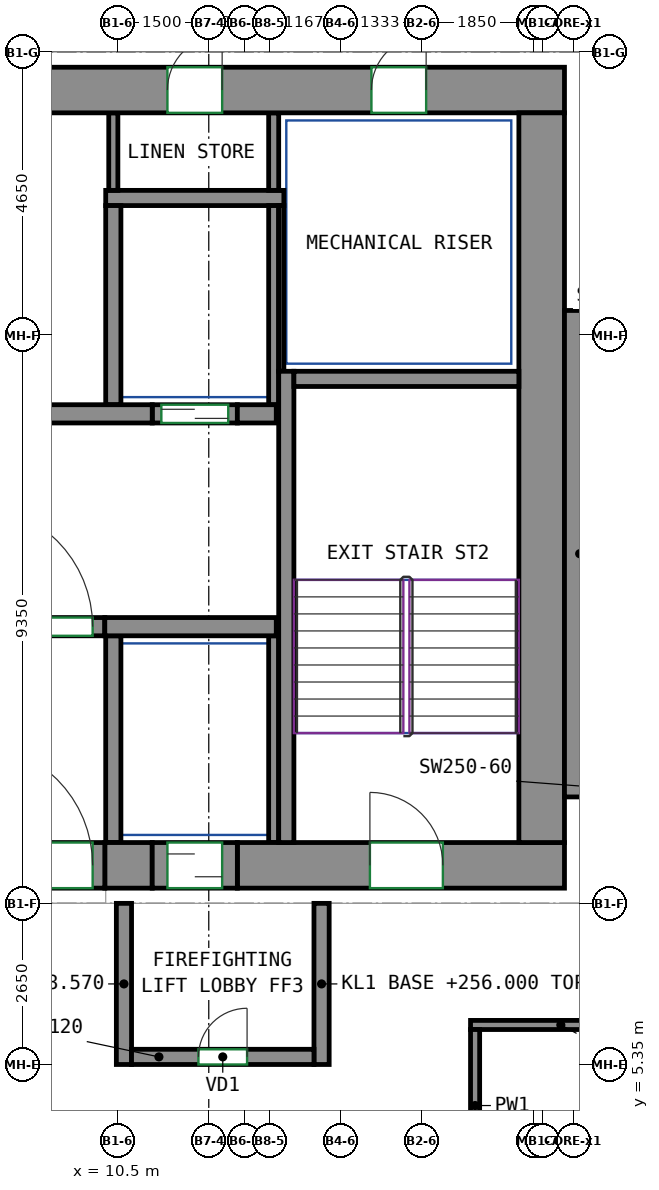
"""IFC4 building model, lengths in metres.
Left out: names, types, materials, properties, quantities, classifications, styles, units other than length and angle.
Written with IfcOpenShell. Run it as: python <this file> out.ifc"""

import sys

from ifc_helpers import new_model, si_unit, direction, frame, frame_2d, origin, place, context, subcontext, project, spatial, rectangle, extrude, source, transform, mapped, element, fill, save


model = new_model("IFC4")
c1 = context("Model", 3, precision=1e-05, world=origin(), true_north=direction((0.0, 1.0)))
c2 = subcontext(c1, "Body", "Model", "MODEL_VIEW")
j1 = project(units=[si_unit("LENGTHUNIT", "METRE"), si_unit("PLANEANGLEUNIT", "RADIAN")], contexts=[c1])
p1 = place(None, origin())
s1 = spatial("IfcSite", under=j1, at=p1, CompositionType="ELEMENT")
p2 = place(p1, origin())
s2 = spatial("IfcBuilding", under=s1, at=p2, CompositionType="ELEMENT")
p3 = place(p2, frame((0.0, 0.0, 256.0)))
s3 = spatial("IfcBuildingStorey", under=s2, at=p3, CompositionType="ELEMENT", Elevation=256.0)
m1 = source(origin(), c2, "Body", "SweptSolid", [
    extrude(rectangle(XDim=0.78, YDim=0.75, at=frame_2d((0.39, 0.0))), origin(), (0.0, 0.0, 1.0), 3.12),
])
p4 = place(p3, frame((10.29, 8.625, 0.0), z_axis=(0.0, 0.0, 1.0), x_axis=(1.0, 0.0, 0.0)))
e1 = element("IfcWall", 1, at=p4, inside=s3, PredefinedType="SHEAR", context=c2, shape_type="MappedRepresentation", body=[
    mapped(m1, transform((0.0, 0.0, 0.0))),
])
m2 = source(origin(), c2, "Body", "SweptSolid", [
    extrude(rectangle(XDim=5.38, YDim=0.75, at=frame_2d((2.69, 0.0))), origin(), (0.0, 0.0, 1.0), 3.12),
])
p5 = place(p3, frame((12.47, 8.625, 0.0), z_axis=(0.0, 0.0, 1.0), x_axis=(1.0, 0.0, 0.0)))
e2 = element("IfcWall", 2, at=p5, inside=s3, PredefinedType="SHEAR", context=c2, shape_type="MappedRepresentation", body=[
    mapped(m2, transform((0.0, 0.0, 0.0))),
])
p6 = place(p5, frame((2.18, 0.0, 0.0)))
e3 = element("IfcOpeningElement", 3, at=p6, cuts=e2, PredefinedType="OPENING", context=c2, shape_type="SweptSolid", body=[
    extrude(rectangle(XDim=1.2, YDim=2.1, at=frame_2d((0.6, 1.05))), frame((0.0, 0.385, 0.0), z_axis=(0.0, -1.0, 0.0), x_axis=(1.0, 0.0, 0.0)), (0.0, 0.0, 1.0), 0.77),
])
m3 = source(origin(), c2, "Body", "SweptSolid", [
    extrude(rectangle(XDim=33.6, YDim=0.75, at=frame_2d((16.8, 0.0))), origin(), (0.0, 0.0, 1.0), 3.12),
])
p7 = place(p3, frame((-15.75, 21.375, 0.0), z_axis=(0.0, 0.0, 1.0), x_axis=(1.0, 0.0, 0.0)))
e4 = element("IfcWall", 4, at=p7, inside=s3, PredefinedType="SHEAR", context=c2, shape_type="MappedRepresentation", body=[
    mapped(m3, transform((0.0, 0.0, 0.0))),
])
p8 = place(p7, frame((5.858, 0.0, 0.0)))
e5 = element("IfcOpeningElement", 5, at=p8, cuts=e4, PredefinedType="OPENING", context=c2, shape_type="SweptSolid", body=[
    extrude(rectangle(XDim=0.9, YDim=2.1, at=frame_2d((0.45, 1.05))), frame((0.0, 0.385, 0.0), z_axis=(0.0, -1.0, 0.0), x_axis=(1.0, 0.0, 0.0)), (0.0, 0.0, 1.0), 0.77),
])
p9 = place(p7, frame((10.923, 0.0, 0.0)))
e6 = element("IfcOpeningElement", 6, at=p9, cuts=e4, PredefinedType="OPENING", context=c2, shape_type="SweptSolid", body=[
    extrude(rectangle(XDim=0.9, YDim=2.1, at=frame_2d((0.45, 1.05))), frame((0.0, 0.385, 0.0), z_axis=(0.0, -1.0, 0.0), x_axis=(1.0, 0.0, 0.0)), (0.0, 0.0, 1.0), 0.77),
])
p10 = place(p7, frame((15.988, 0.0, 0.0)))
e7 = element("IfcOpeningElement", 7, at=p10, cuts=e4, PredefinedType="OPENING", context=c2, shape_type="SweptSolid", body=[
    extrude(rectangle(XDim=0.9, YDim=2.1, at=frame_2d((0.45, 1.05))), frame((0.0, 0.385, 0.0), z_axis=(0.0, -1.0, 0.0), x_axis=(1.0, 0.0, 0.0)), (0.0, 0.0, 1.0), 0.77),
])
p11 = place(p7, frame((21.643, 0.0, 0.0)))
e8 = element("IfcOpeningElement", 8, at=p11, cuts=e4, PredefinedType="OPENING", context=c2, shape_type="SweptSolid", body=[
    extrude(rectangle(XDim=0.9, YDim=2.1, at=frame_2d((0.45, 1.05))), frame((0.0, 0.385, 0.0), z_axis=(0.0, -1.0, 0.0), x_axis=(1.0, 0.0, 0.0)), (0.0, 0.0, 1.0), 0.77),
])
p12 = place(p7, frame((27.07, 0.0, 0.0)))
e9 = element("IfcOpeningElement", 9, at=p12, cuts=e4, PredefinedType="OPENING", context=c2, shape_type="SweptSolid", body=[
    extrude(rectangle(XDim=0.9, YDim=2.1, at=frame_2d((0.45, 1.05))), frame((0.0, 0.385, 0.0), z_axis=(0.0, -1.0, 0.0), x_axis=(1.0, 0.0, 0.0)), (0.0, 0.0, 1.0), 0.77),
])
p13 = place(p7, frame((2.275, 0.0, 0.0)))
e10 = element("IfcOpeningElement", 10, at=p13, cuts=e4, PredefinedType="OPENING", context=c2, shape_type="SweptSolid", body=[
    extrude(rectangle(XDim=0.9, YDim=2.1, at=frame_2d((0.45, 1.05))), frame((0.0, 0.385, 0.0), z_axis=(0.0, -1.0, 0.0), x_axis=(1.0, 0.0, 0.0)), (0.0, 0.0, 1.0), 0.77),
])
p14 = place(p7, frame((30.425, 0.0, 0.0)))
e11 = element("IfcOpeningElement", 11, at=p14, cuts=e4, PredefinedType="OPENING", context=c2, shape_type="SweptSolid", body=[
    extrude(rectangle(XDim=0.9, YDim=2.1, at=frame_2d((0.45, 1.05))), frame((0.0, 0.385, 0.0), z_axis=(0.0, -1.0, 0.0), x_axis=(1.0, 0.0, 0.0)), (0.0, 0.0, 1.0), 0.77),
])
m4 = source(origin(), c2, "Body", "SweptSolid", [
    extrude(rectangle(XDim=12.0, YDim=0.75, at=frame_2d((6.0, 0.0))), origin(), (0.0, 0.0, 1.0), 3.12),
])
p15 = place(p3, frame((17.475, 9.0, 0.0), z_axis=(0.0, 0.0, 1.0), x_axis=(0.0, 1.0, 0.0)))
e12 = element("IfcWall", 12, at=p15, inside=s3, PredefinedType="SHEAR", context=c2, shape_type="MappedRepresentation", body=[
    mapped(m4, transform((0.0, 0.0, 0.0))),
])
m5 = source(origin(), c2, "Body", "SweptSolid", [
    extrude(rectangle(XDim=7.75, YDim=0.25, at=frame_2d((3.875, 0.0))), origin(), (0.0, 0.0, 1.0), 3.12),
])
p16 = place(p3, frame((13.275, 9.0, 0.0), z_axis=(0.0, 0.0, 1.0), x_axis=(0.0, 1.0, 0.0)))
e13 = element("IfcWall", 13, at=p16, inside=s3, PredefinedType="SHEAR", context=c2, shape_type="MappedRepresentation", body=[
    mapped(m5, transform((0.0, 0.0, 0.0))),
])
m6 = source(origin(), c2, "Body", "SweptSolid", [
    extrude(rectangle(XDim=3.7, YDim=0.25, at=frame_2d((1.85, 0.0))), origin(), (0.0, 0.0, 1.0), 3.12),
])
p17 = place(p3, frame((13.4, 16.625, 0.0), z_axis=(0.0, 0.0, 1.0), x_axis=(1.0, 0.0, 0.0)))
e14 = element("IfcWall", 14, at=p17, inside=s3, PredefinedType="SHEAR", context=c2, shape_type="MappedRepresentation", body=[
    mapped(m6, transform((0.0, 0.0, 0.0))),
])
m7 = source(origin(), c2, "Body", "SweptSolid", [
    extrude(rectangle(XDim=8.0, YDim=0.5, at=frame_2d((4.0, 0.0))), origin(), (0.0, 0.0, 1.0), 3.12),
])
p18 = place(p3, frame((18.1, 9.75, 0.0), z_axis=(0.0, 0.0, 1.0), x_axis=(0.0, 1.0, 0.0)))
e15 = element("IfcWall", 15, at=p18, inside=s3, PredefinedType="SHEAR", context=c2, shape_type="MappedRepresentation", body=[
    mapped(m7, transform((0.0, 0.0, 0.0))),
])
m8 = source(origin(), c2, "Body", "SweptSolid", [
    extrude(rectangle(XDim=2.82, YDim=0.3, at=frame_2d((1.41, 0.0))), origin(), (0.0, 0.0, 1.0), 3.12),
])
p19 = place(p3, frame((10.29, 12.55, 0.0), z_axis=(0.0, 0.0, 1.0), x_axis=(1.0, 0.0, 0.0)))
e16 = element("IfcWall", 16, at=p19, inside=s3, PredefinedType="SHEAR", context=c2, shape_type="MappedRepresentation", body=[
    mapped(m8, transform((0.0, 0.0, 0.0))),
])
m9 = source(origin(), c2, "Body", "SweptSolid", [
    extrude(rectangle(XDim=22.08, YDim=0.3, at=frame_2d((11.04, 0.0))), origin(), (0.0, 0.0, 1.0), 3.12),
])
p20 = place(p3, frame((-11.01, 16.05, 0.0), z_axis=(0.0, 0.0, 1.0), x_axis=(1.0, 0.0, 0.0)))
e17 = element("IfcWall", 17, at=p20, inside=s3, PredefinedType="SHEAR", context=c2, shape_type="MappedRepresentation", body=[
    mapped(m9, transform((0.0, 0.0, 0.0))),
])
m10 = source(origin(), c2, "Body", "SweptSolid", [
    extrude(rectangle(XDim=0.64, YDim=0.3, at=frame_2d((0.32, 0.0))), origin(), (0.0, 0.0, 1.0), 3.12),
])
p21 = place(p3, frame((12.47, 16.05, 0.0), z_axis=(0.0, 0.0, 1.0), x_axis=(1.0, 0.0, 0.0)))
e18 = element("IfcWall", 18, at=p21, inside=s3, PredefinedType="SHEAR", context=c2, shape_type="MappedRepresentation", body=[
    mapped(m10, transform((0.0, 0.0, 0.0))),
])
m11 = source(origin(), c2, "Body", "SweptSolid", [
    extrude(rectangle(XDim=1.4, YDim=0.3, at=frame_2d((0.7, 0.0))), origin(), (0.0, 0.0, 1.0), 3.12),
])
p22 = place(p3, frame((11.07, 16.05, 0.0), z_axis=(0.0, 0.0, 1.0), x_axis=(1.0, 0.0, 0.0)))
e19 = element("IfcWall", 19, at=p22, inside=s3, PredefinedType="PARTITIONING", context=c2, shape_type="MappedRepresentation", body=[
    mapped(m11, transform((0.0, 0.0, 0.0))),
])
p23 = place(p22, frame((0.15, 0.0, 0.0)))
e20 = element("IfcOpeningElement", 20, at=p23, cuts=e19, PredefinedType="OPENING", context=c2, shape_type="SweptSolid", body=[
    extrude(rectangle(XDim=1.1, YDim=2.1, at=frame_2d((0.55, 1.05))), frame((0.0, 0.16, 0.0), z_axis=(0.0, -1.0, 0.0), x_axis=(1.0, 0.0, 0.0)), (0.0, 0.0, 1.0), 0.32),
])
m12 = source(origin(), c2, "Body", "SweptSolid", [
    extrude(rectangle(XDim=2.4, YDim=0.3, at=frame_2d((1.2, 0.0))), origin(), (0.0, 0.0, 1.0), 3.12),
])
p24 = place(p3, frame((7.89, 12.55, 0.0), z_axis=(0.0, 0.0, 1.0), x_axis=(1.0, 0.0, 0.0)))
e21 = element("IfcWall", 21, at=p24, inside=s3, PredefinedType="PARTITIONING", context=c2, shape_type="MappedRepresentation", body=[
    mapped(m12, transform((0.0, 0.0, 0.0))),
])
p25 = place(p24, frame((0.2, 0.0, 0.0)))
e22 = element("IfcOpeningElement", 22, at=p25, cuts=e21, PredefinedType="OPENING", context=c2, shape_type="SweptSolid", body=[
    extrude(rectangle(XDim=2.0, YDim=2.1, at=frame_2d((1.0, 1.05))), frame((0.0, 0.16, 0.0), z_axis=(0.0, -1.0, 0.0), x_axis=(1.0, 0.0, 0.0)), (0.0, 0.0, 1.0), 0.32),
])
m13 = source(origin(), c2, "Body", "SweptSolid", [
    extrude(rectangle(XDim=2.65, YDim=0.25, at=frame_2d((1.325, 0.0))), origin(), (0.0, 0.0, 1.0), 2.57),
])
for number, where, z_axis, x_axis in (
    (23, (10.605, 5.35, 0.0), (0.0, 0.0, 1.0), (0.0, 1.0, 0.0)),
    (24, (13.855, 5.35, 0.0), (0.0, 0.0, 1.0), (0.0, 1.0, 0.0)),
):
    element("IfcWall", number, at=place(p3, frame(where, z_axis=z_axis, x_axis=x_axis)), inside=s3, PredefinedType="PARTITIONING", context=c2, shape_type="MappedRepresentation", body=[
        mapped(m13, transform((0.0, 0.0, 0.0))),
    ])
m14 = source(origin(), c2, "Body", "SweptSolid", [
    extrude(rectangle(XDim=3.0, YDim=0.25, at=frame_2d((1.5, 0.0))), origin(), (0.0, 0.0, 1.0), 3.12),
])
p26 = place(p3, frame((10.73, 5.475, 0.0), z_axis=(0.0, 0.0, 1.0), x_axis=(1.0, 0.0, 0.0)))
e25 = element("IfcWall", 25, at=p26, inside=s3, PredefinedType="PARTITIONING", context=c2, shape_type="MappedRepresentation", body=[
    mapped(m14, transform((0.0, 0.0, 0.0))),
])
p27 = place(p26, frame((1.1, 0.0, 0.0)))
e26 = element("IfcOpeningElement", 26, at=p27, cuts=e25, PredefinedType="OPENING", context=c2, shape_type="SweptSolid", body=[
    extrude(rectangle(XDim=0.8, YDim=2.0, at=frame_2d((0.4, 1.0))), frame((0.0, 0.135, 0.0), z_axis=(0.0, -1.0, 0.0), x_axis=(1.0, 0.0, 0.0)), (0.0, 0.0, 1.0), 0.27),
])
m15 = source(origin(), c2, "Body", "SweptSolid", [
    extrude(rectangle(XDim=2.93, YDim=0.25, at=frame_2d((1.465, 0.0))), origin(), (0.0, 0.0, 1.0), 3.12),
])
p28 = place(p3, frame((10.305, 19.6, 0.0), z_axis=(0.0, 0.0, 1.0), x_axis=(1.0, 0.0, 0.0)))
e27 = element("IfcWall", 27, at=p28, inside=s3, PredefinedType="PARTITIONING", context=c2, shape_type="MappedRepresentation", body=[
    mapped(m15, transform((0.0, 0.0, 0.0))),
])
m16 = source(origin(), c2, "Body", "SweptSolid", [
    extrude(rectangle(XDim=3.275, YDim=0.165, at=frame_2d((1.638, 0.0))), origin(), (0.0, 0.0, 1.0), 3.12),
])
p29 = place(p3, frame((13.067, 16.2, 0.0), z_axis=(0.0, 0.0, 1.0), x_axis=(0.0, 1.0, 0.0)))
e28 = element("IfcWall", 28, at=p29, inside=s3, PredefinedType="PARTITIONING", context=c2, shape_type="MappedRepresentation", body=[
    mapped(m16, transform((0.0, 0.0, 0.0))),
])
m17 = source(origin(), c2, "Body", "SweptSolid", [
    extrude(rectangle(XDim=1.275, YDim=0.165, at=frame_2d((0.637, 0.0))), origin(), (0.0, 0.0, 1.0), 3.12),
])
p30 = place(p3, frame((13.067, 19.725, 0.0), z_axis=(0.0, 0.0, 1.0), x_axis=(0.0, 1.0, 0.0)))
e29 = element("IfcWall", 29, at=p30, inside=s3, PredefinedType="PARTITIONING", context=c2, shape_type="MappedRepresentation", body=[
    mapped(m17, transform((0.0, 0.0, 0.0))),
])
m18 = source(origin(), c2, "Body", "SweptSolid", [
    extrude(rectangle(XDim=3.275, YDim=0.25, at=frame_2d((1.638, 0.0))), origin(), (0.0, 0.0, 1.0), 3.12),
])
p31 = place(p3, frame((10.43, 16.2, 0.0), z_axis=(0.0, 0.0, 1.0), x_axis=(0.0, 1.0, 0.0)))
e30 = element("IfcWall", 30, at=p31, inside=s3, PredefinedType="PARTITIONING", context=c2, shape_type="MappedRepresentation", body=[
    mapped(m18, transform((0.0, 0.0, 0.0))),
])
m19 = source(origin(), c2, "Body", "SweptSolid", [
    extrude(rectangle(XDim=2.725, YDim=0.085, at=frame_2d((1.363, 0.0))), origin(), (0.0, 0.0, 1.0), 3.12),
])
p32 = place(p3, frame((13.192, 16.75, 0.0), z_axis=(0.0, 0.0, 1.0), x_axis=(0.0, 1.0, 0.0)))
e31 = element("IfcWall", 31, at=p32, inside=s3, PredefinedType="PARTITIONING", context=c2, shape_type="MappedRepresentation", body=[
    mapped(m19, transform((0.0, 0.0, 0.0))),
])
m20 = source(origin(), c2, "Body", "SweptSolid", [
    extrude(rectangle(XDim=3.4, YDim=0.25, at=frame_2d((1.7, 0.0))), origin(), (0.0, 0.0, 1.0), 3.12),
])
p33 = place(p3, frame((10.43, 9.0, 0.0), z_axis=(0.0, 0.0, 1.0), x_axis=(0.0, 1.0, 0.0)))
e32 = element("IfcWall", 32, at=p33, inside=s3, PredefinedType="PARTITIONING", context=c2, shape_type="MappedRepresentation", body=[
    mapped(m20, transform((0.0, 0.0, 0.0))),
])
m21 = source(origin(), c2, "Body", "SweptSolid", [
    extrude(rectangle(XDim=3.4, YDim=0.165, at=frame_2d((1.7, 0.0))), origin(), (0.0, 0.0, 1.0), 3.12),
])
p34 = place(p3, frame((13.067, 9.0, 0.0), z_axis=(0.0, 0.0, 1.0), x_axis=(0.0, 1.0, 0.0)))
e33 = element("IfcWall", 33, at=p34, inside=s3, PredefinedType="PARTITIONING", context=c2, shape_type="MappedRepresentation", body=[
    mapped(m21, transform((0.0, 0.0, 0.0))),
])
m22 = source(origin(), c2, "Body", "SweptSolid", [
    extrude(rectangle(XDim=1.275, YDim=0.15, at=frame_2d((0.637, 0.0))), origin(), (0.0, 0.0, 1.0), 3.12),
])
p35 = place(p3, frame((10.43, 19.725, 0.0), z_axis=(0.0, 0.0, 1.0), x_axis=(0.0, 1.0, 0.0)))
e34 = element("IfcWall", 34, at=p35, inside=s3, PredefinedType="PARTITIONING", context=c2, shape_type="MappedRepresentation", body=[
    mapped(m22, transform((0.0, 0.0, 0.0))),
])
m23 = source(origin(), c2, "Body", "SweptSolid", [
    extrude(rectangle(XDim=2.4, YDim=0.75, at=frame_2d((1.2, 0.0))), origin(), (0.0, 0.0, 1.0), 2.7),
])
p36 = place(p3, frame((7.89, 8.625, 0.0), z_axis=(0.0, 0.0, 1.0), x_axis=(1.0, 0.0, 0.0)))
e35 = element("IfcWall", 35, at=p36, inside=s3, PredefinedType="PARTITIONING", context=c2, shape_type="MappedRepresentation", body=[
    mapped(m23, transform((0.0, 0.0, 0.0))),
])
p37 = place(p36, frame((0.2, 0.0, 0.0)))
e36 = element("IfcOpeningElement", 36, at=p37, cuts=e35, PredefinedType="OPENING", context=c2, shape_type="SweptSolid", body=[
    extrude(rectangle(XDim=2.0, YDim=2.1, at=frame_2d((1.0, 1.05))), frame((0.0, 0.385, 0.0), z_axis=(0.0, -1.0, 0.0), x_axis=(1.0, 0.0, 0.0)), (0.0, 0.0, 1.0), 0.77),
])
m24 = source(origin(), c2, "Body", "SweptSolid", [
    extrude(rectangle(XDim=1.4, YDim=0.75, at=frame_2d((0.7, 0.0))), origin(), (0.0, 0.0, 1.0), 2.7),
])
p38 = place(p3, frame((11.07, 8.625, 0.0), z_axis=(0.0, 0.0, 1.0), x_axis=(1.0, 0.0, 0.0)))
e37 = element("IfcWall", 37, at=p38, inside=s3, PredefinedType="PARTITIONING", context=c2, shape_type="MappedRepresentation", body=[
    mapped(m24, transform((0.0, 0.0, 0.0))),
])
p39 = place(p38, frame((0.25, 0.0, 0.0)))
e38 = element("IfcOpeningElement", 38, at=p39, cuts=e37, PredefinedType="OPENING", context=c2, shape_type="SweptSolid", body=[
    extrude(rectangle(XDim=0.9, YDim=2.1, at=frame_2d((0.45, 1.05))), frame((0.0, 0.385, 0.0), z_axis=(0.0, -1.0, 0.0), x_axis=(1.0, 0.0, 0.0)), (0.0, 0.0, 1.0), 0.77),
])
p40 = place(p3, frame((16.305, 6.0, 0.0), z_axis=(0.0, 0.0, 1.0), x_axis=(1.0, 0.0, 0.0)))
e39 = element("IfcWall", 39, at=p40, inside=s3, PredefinedType="PARTITIONING", context=c2, shape_type="SweptSolid", body=[
    extrude(rectangle(XDim=2.97, YDim=0.15, at=frame_2d((1.485, 0.0))), origin(), (0.0, 0.0, 1.0), 3.12),
])
p41 = place(p3, frame((16.38, 3.425, 0.0), z_axis=(0.0, 0.0, 1.0), x_axis=(0.0, 1.0, 0.0)))
e40 = element("IfcWall", 40, at=p41, inside=s3, PredefinedType="PARTITIONING", context=c2, shape_type="SweptSolid", body=[
    extrude(rectangle(XDim=2.5, YDim=0.15, at=frame_2d((1.25, 0.0))), origin(), (0.0, 0.0, 1.0), 3.12),
])
p42 = place(p25, origin())
e41 = element("IfcDoor", 41, at=p42, inside=s3, OperationType="DOUBLE_DOOR_SINGLE_SWING", PredefinedType="DOOR", context=c2, shape_type="SweptSolid", body=[
    extrude(rectangle(XDim=2.0, YDim=2.1, at=frame_2d((1.0, 1.05))), frame((0.0, 0.025, 0.0), z_axis=(0.0, -1.0, 0.0), x_axis=(1.0, 0.0, 0.0)), (0.0, 0.0, 1.0), 0.05),
])
fill(e22, e41)
p43 = place(p37, origin())
e42 = element("IfcDoor", 42, at=p43, inside=s3, OperationType="DOUBLE_DOOR_SINGLE_SWING", PredefinedType="DOOR", context=c2, shape_type="SweptSolid", body=[
    extrude(rectangle(XDim=2.0, YDim=2.1, at=frame_2d((1.0, 1.05))), frame((0.0, 0.28, 0.0), z_axis=(0.0, -1.0, 0.0), x_axis=(1.0, 0.0, 0.0)), (0.0, 0.0, 1.0), 0.05),
])
fill(e36, e42)
p44 = place(p27, origin())
e43 = element("IfcDoor", 43, at=p44, inside=s3, OperationType="SINGLE_SWING_RIGHT", PredefinedType="DOOR", context=c2, shape_type="SweptSolid", body=[
    extrude(rectangle(XDim=0.8, YDim=2.0, at=frame_2d((0.4, 1.0))), frame((0.0, 0.025, 0.0), z_axis=(0.0, -1.0, 0.0), x_axis=(1.0, 0.0, 0.0)), (0.0, 0.0, 1.0), 0.05),
])
fill(e26, e43)
p45 = place(p39, origin())
e44 = element("IfcDoor", 44, at=p45, inside=s3, OperationType="SLIDING_TO_LEFT", PredefinedType="DOOR", context=c2, shape_type="SweptSolid", body=[
    extrude(rectangle(XDim=0.9, YDim=2.1, at=frame_2d((0.45, 1.05))), frame((0.0, 0.28, 0.0), z_axis=(0.0, -1.0, 0.0), x_axis=(1.0, 0.0, 0.0)), (0.0, 0.0, 1.0), 0.05),
])
fill(e38, e44)
p46 = place(p23, origin())
e45 = element("IfcDoor", 45, at=p46, inside=s3, OperationType="DOUBLE_DOOR_SLIDING", PredefinedType="DOOR", context=c2, shape_type="SweptSolid", body=[
    extrude(rectangle(XDim=1.1, YDim=2.1, at=frame_2d((0.55, 1.05))), frame((0.0, 0.025, 0.0), z_axis=(0.0, -1.0, 0.0), x_axis=(1.0, 0.0, 0.0)), (0.0, 0.0, 1.0), 0.05),
])
fill(e20, e45)
p47 = place(p12, origin())
e46 = element("IfcDoor", 46, at=p47, inside=s3, OperationType="SINGLE_SWING_RIGHT", PredefinedType="DOOR", context=c2, shape_type="SweptSolid", body=[
    extrude(rectangle(XDim=0.9, YDim=2.1, at=frame_2d((0.45, 1.05))), frame((0.0, -0.23, 0.0), z_axis=(0.0, -1.0, 0.0), x_axis=(1.0, 0.0, 0.0)), (0.0, 0.0, 1.0), 0.05),
])
fill(e9, e46)
p48 = place(p14, origin())
e47 = element("IfcDoor", 47, at=p48, inside=s3, OperationType="SINGLE_SWING_RIGHT", PredefinedType="DOOR", context=c2, shape_type="SweptSolid", body=[
    extrude(rectangle(XDim=0.9, YDim=2.1, at=frame_2d((0.45, 1.05))), frame((0.0, -0.23, 0.0), z_axis=(0.0, -1.0, 0.0), x_axis=(1.0, 0.0, 0.0)), (0.0, 0.0, 1.0), 0.05),
])
fill(e11, e47)
p49 = place(p6, origin())
e48 = element("IfcDoor", 48, at=p49, inside=s3, OperationType="DOUBLE_DOOR_SINGLE_SWING", PredefinedType="DOOR", context=c2, shape_type="SweptSolid", body=[
    extrude(rectangle(XDim=1.2, YDim=2.1, at=frame_2d((0.6, 1.05))), frame((0.0, 0.28, 0.0), z_axis=(0.0, -1.0, 0.0), x_axis=(1.0, 0.0, 0.0)), (0.0, 0.0, 1.0), 0.05),
])
fill(e3, e48)
save(model, sys.argv[1])
